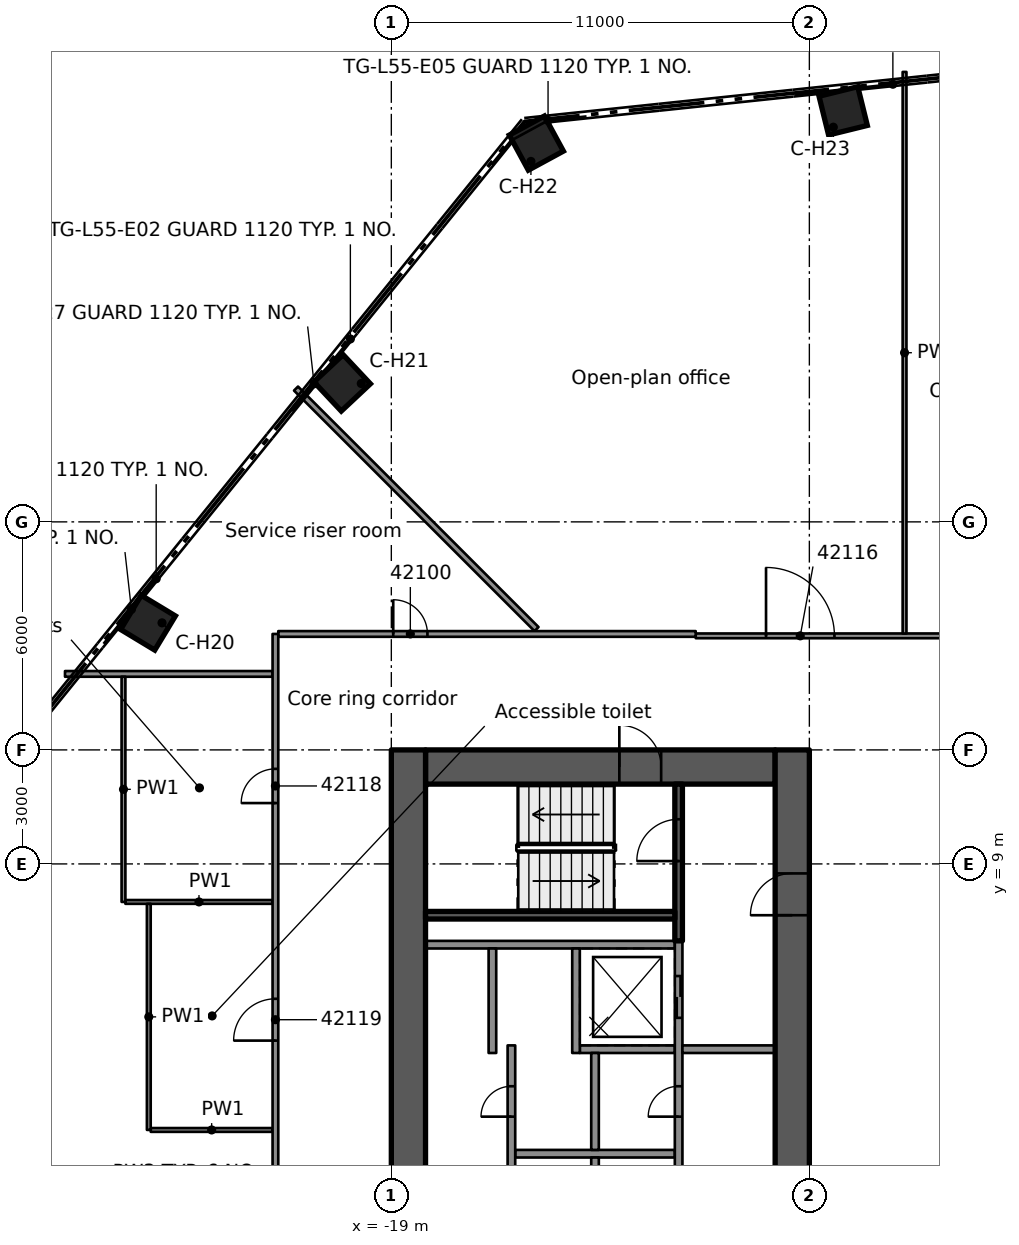
"""IFC4 building model, lengths in metres.
Left out: names, types, materials, properties, quantities, classifications, styles, units other than length and angle.
Written with IfcOpenShell. Run it as: python <this file> out.ifc"""

import sys

from ifc_helpers import new_model, si_unit, direction, frame, frame_2d, origin, origin_2d, place, context, subcontext, project, spatial, rectangle, extrude, element, fill, save


model = new_model("IFC4")
c1 = context("Model", 3, precision=1e-05, world=origin(), true_north=direction((0.0, 1.0)))
c2 = subcontext(c1, "Body", "Model", "MODEL_VIEW")
j1 = project(units=[si_unit("LENGTHUNIT", "METRE"), si_unit("PLANEANGLEUNIT", "RADIAN")], contexts=[c1])
p1 = place(None, origin())
s1 = spatial("IfcSite", under=j1, at=p1, CompositionType="ELEMENT")
p2 = place(p1, origin())
s2 = spatial("IfcBuilding", under=s1, at=p2, CompositionType="ELEMENT")
p3 = place(p2, frame((0.0, 0.0, 210.5)))
s3 = spatial("IfcBuildingStorey", under=s2, at=p3, CompositionType="ELEMENT", Elevation=210.5)
p4 = place(p3, frame((-18.1, 11.55, 0.0), z_axis=(0.0, 0.0, 1.0), x_axis=(1.0, 0.0, 0.0)))
e1 = element("IfcWall", 1, at=p4, inside=s3, PredefinedType="SHEAR", context=c2, shape_type="SweptSolid", body=[
    extrude(rectangle(XDim=9.2, YDim=0.9, at=frame_2d((4.6, 0.0))), origin(), (0.0, 0.0, 1.0), 3.5),
])
p5 = place(p4, frame((5.1, 0.0, 0.0)))
e2 = element("IfcOpeningElement", 2, at=p5, cuts=e1, PredefinedType="OPENING", context=c2, shape_type="SweptSolid", body=[
    extrude(rectangle(XDim=1.1, YDim=2.1, at=frame_2d((0.55, 1.05))), frame((0.0, 0.46, 0.0), z_axis=(0.0, -1.0, 0.0), x_axis=(1.0, 0.0, 0.0)), (0.0, 0.0, 1.0), 0.92),
])
p6 = place(p3, frame((-18.55, -12.0, 0.0), z_axis=(0.0, 0.0, 1.0), x_axis=(0.0, 1.0, 0.0)))
e3 = element("IfcWall", 3, at=p6, inside=s3, PredefinedType="SHEAR", context=c2, shape_type="SweptSolid", body=[
    extrude(rectangle(XDim=24.0, YDim=0.9, at=frame_2d((12.0, 0.0))), origin(), (0.0, 0.0, 1.0), 3.5),
])
p7 = place(p6, frame((10.1, 0.0, 0.0)))
e4 = element("IfcOpeningElement", 4, at=p7, cuts=e3, PredefinedType="OPENING", context=c2, shape_type="SweptSolid", body=[
    extrude(rectangle(XDim=1.8, YDim=2.1, at=frame_2d((0.9, 1.05))), frame((0.0, 0.46, 0.0), z_axis=(0.0, -1.0, 0.0), x_axis=(1.0, 0.0, 0.0)), (0.0, 0.0, 1.0), 0.92),
])
p8 = place(p3, frame((-8.45, -12.0, 0.0), z_axis=(0.0, 0.0, 1.0), x_axis=(0.0, 1.0, 0.0)))
e5 = element("IfcWall", 5, at=p8, inside=s3, PredefinedType="SHEAR", context=c2, shape_type="SweptSolid", body=[
    extrude(rectangle(XDim=24.0, YDim=0.9, at=frame_2d((12.0, 0.0))), origin(), (0.0, 0.0, 1.0), 3.5),
])
p9 = place(p8, frame((9.6, 0.0, 0.0)))
e6 = element("IfcOpeningElement", 6, at=p9, cuts=e5, PredefinedType="OPENING", context=c2, shape_type="SweptSolid", body=[
    extrude(rectangle(XDim=1.8, YDim=2.1, at=frame_2d((0.9, 1.05))), frame((0.0, 0.46, 0.0), z_axis=(0.0, -1.0, 0.0), x_axis=(1.0, 0.0, 0.0)), (0.0, 0.0, 1.0), 0.92),
])
p10 = place(p8, frame((19.65, 0.0, 0.0)))
e7 = element("IfcOpeningElement", 7, at=p10, cuts=e5, PredefinedType="OPENING", context=c2, shape_type="SweptSolid", body=[
    extrude(rectangle(XDim=1.1, YDim=2.1, at=frame_2d((0.55, 1.05))), frame((0.0, 0.46, 0.0), z_axis=(0.0, -1.0, 0.0), x_axis=(1.0, 0.0, 0.0)), (0.0, 0.0, 1.0), 0.92),
])
for number, where, z_axis, x_axis in (
    (8, (-25.403, 15.347, 0.0), (0.0, 0.0, 1.0), (-0.856, 0.517, 0.0)),
    (9, (-20.293, 21.657, 0.0), (0.0, 0.0, 1.0), (-0.684, 0.73, 0.0)),
    (10, (-15.184, 27.966, 0.0), (0.0, 0.0, 1.0), (-0.477, 0.879, 0.0)),
    (11, (-7.11, 28.815, 0.0), (0.0, 0.0, 1.0), (-0.24, 0.971, 0.0)),
):
    element("IfcColumn", number, at=place(p3, frame(where, z_axis=z_axis, x_axis=x_axis)), inside=s3, PredefinedType="COLUMN", context=c2, shape_type="SweptSolid", body=[
        extrude(rectangle(XDim=1.05, YDim=1.05, at=origin_2d()), origin(), (0.0, 0.0, 1.0), 3.5),
    ])
p11 = place(p3, frame((-11.54, 6.875, 0.0), z_axis=(0.0, 0.0, 1.0), x_axis=(-1.0, 0.0, 0.0)))
e12 = element("IfcWall", 12, at=p11, inside=s3, PredefinedType="SOLIDWALL", context=c2, shape_type="SweptSolid", body=[
    extrude(rectangle(XDim=6.56, YDim=0.2, at=frame_2d((3.28, 0.0))), origin(), (0.0, 0.0, 1.0), 3.09),
])
p12 = place(p3, frame((-11.54, 1.375, 0.0), z_axis=(0.0, 0.0, 1.0), x_axis=(-1.0, 0.0, 0.0)))
e13 = element("IfcWall", 13, at=p12, inside=s3, PredefinedType="SOLIDWALL", context=c2, shape_type="SweptSolid", body=[
    extrude(rectangle(XDim=4.2, YDim=0.2, at=frame_2d((2.1, 0.0))), origin(), (0.0, 0.0, 1.0), 3.09),
])
p13 = place(p3, frame((-11.54, 4.125, 0.0), z_axis=(0.0, 0.0, 1.0), x_axis=(-1.0, 0.0, 0.0)))
e14 = element("IfcWall", 14, at=p13, inside=s3, PredefinedType="SOLIDWALL", context=c2, shape_type="SweptSolid", body=[
    extrude(rectangle(XDim=2.5, YDim=0.2, at=frame_2d((1.25, 0.0))), origin(), (0.0, 0.0, 1.0), 3.09),
])
p14 = place(p3, frame((-11.44, -6.975, 0.0), z_axis=(0.0, 0.0, 1.0), x_axis=(0.0, 1.0, 0.0)))
e15 = element("IfcWall", 15, at=p14, inside=s3, PredefinedType="SOLIDWALL", context=c2, shape_type="SweptSolid", body=[
    extrude(rectangle(XDim=13.95, YDim=0.2, at=frame_2d((6.975, 0.0))), origin(), (0.0, 0.0, 1.0), 3.09),
])
p15 = place(p14, frame((0.925, 0.0, 0.0)))
e16 = element("IfcOpeningElement", 16, at=p15, cuts=e15, PredefinedType="OPENING", context=c2, shape_type="SweptSolid", body=[
    extrude(rectangle(XDim=1.1, YDim=2.1, at=frame_2d((0.55, 1.05))), frame((0.0, 0.11, 0.0), z_axis=(0.0, -1.0, 0.0), x_axis=(1.0, 0.0, 0.0)), (0.0, 0.0, 1.0), 0.22),
])
p16 = place(p14, frame((3.675, 0.0, 0.0)))
e17 = element("IfcOpeningElement", 17, at=p16, cuts=e15, PredefinedType="OPENING", context=c2, shape_type="SweptSolid", body=[
    extrude(rectangle(XDim=1.1, YDim=2.1, at=frame_2d((0.55, 1.05))), frame((0.0, 0.11, 0.0), z_axis=(0.0, -1.0, 0.0), x_axis=(1.0, 0.0, 0.0)), (0.0, 0.0, 1.0), 0.22),
])
p17 = place(p14, frame((11.925, 0.0, 0.0)))
e18 = element("IfcOpeningElement", 18, at=p17, cuts=e15, PredefinedType="OPENING", context=c2, shape_type="SweptSolid", body=[
    extrude(rectangle(XDim=1.1, YDim=2.1, at=frame_2d((0.55, 1.05))), frame((0.0, 0.11, 0.0), z_axis=(0.0, -1.0, 0.0), x_axis=(1.0, 0.0, 0.0)), (0.0, 0.0, 1.0), 0.22),
])
p18 = place(p14, frame((6.575, 0.0, 0.0)))
e19 = element("IfcOpeningElement", 19, at=p18, cuts=e15, PredefinedType="OPENING", context=c2, shape_type="SweptSolid", body=[
    extrude(rectangle(XDim=0.8, YDim=2.1, at=frame_2d((0.4, 1.05))), frame((0.0, 0.11, 0.0), z_axis=(0.0, -1.0, 0.0), x_axis=(1.0, 0.0, 0.0)), (0.0, 0.0, 1.0), 0.22),
])
p19 = place(p14, frame((9.325, 0.0, 0.0)))
e20 = element("IfcOpeningElement", 20, at=p19, cuts=e15, PredefinedType="OPENING", context=c2, shape_type="SweptSolid", body=[
    extrude(rectangle(XDim=0.8, YDim=2.1, at=frame_2d((0.4, 1.05))), frame((0.0, 0.11, 0.0), z_axis=(0.0, -1.0, 0.0), x_axis=(1.0, 0.0, 0.0)), (0.0, 0.0, 1.0), 0.22),
])
p20 = place(p3, frame((-13.64, -4.025, 0.0), z_axis=(0.0, 0.0, 1.0), x_axis=(0.0, 1.0, 0.0)))
e21 = element("IfcWall", 21, at=p20, inside=s3, PredefinedType="SOLIDWALL", context=c2, shape_type="SweptSolid", body=[
    extrude(rectangle(XDim=5.3, YDim=0.2, at=frame_2d((2.65, 0.0))), origin(), (0.0, 0.0, 1.0), 3.09),
])
p21 = place(p3, frame((-13.64, 1.475, 0.0), z_axis=(0.0, 0.0, 1.0), x_axis=(0.0, 1.0, 0.0)))
e22 = element("IfcWall", 22, at=p21, inside=s3, PredefinedType="SOLIDWALL", context=c2, shape_type="SweptSolid", body=[
    extrude(rectangle(XDim=2.55, YDim=0.2, at=frame_2d((1.275, 0.0))), origin(), (0.0, 0.0, 1.0), 3.09),
])
p22 = place(p3, frame((-14.14, 4.025, 0.0), z_axis=(0.0, 0.0, 1.0), x_axis=(0.0, 1.0, 0.0)))
e23 = element("IfcWall", 23, at=p22, inside=s3, PredefinedType="SOLIDWALL", context=c2, shape_type="SweptSolid", body=[
    extrude(rectangle(XDim=2.75, YDim=0.2, at=frame_2d((1.375, 0.0))), origin(), (0.0, 0.0, 1.0), 3.09),
])
p23 = place(p3, frame((-15.84, -4.025, 0.0), z_axis=(0.0, 0.0, 1.0), x_axis=(0.0, 1.0, 0.0)))
e24 = element("IfcWall", 24, at=p23, inside=s3, PredefinedType="SOLIDWALL", context=c2, shape_type="SweptSolid", body=[
    extrude(rectangle(XDim=8.25, YDim=0.2, at=frame_2d((4.125, 0.0))), origin(), (0.0, 0.0, 1.0), 3.09),
])
p24 = place(p23, frame((0.875, 0.0, 0.0)))
e25 = element("IfcOpeningElement", 25, at=p24, cuts=e24, PredefinedType="OPENING", context=c2, shape_type="SweptSolid", body=[
    extrude(rectangle(XDim=0.8, YDim=2.1, at=frame_2d((0.4, 1.05))), frame((0.0, 0.11, 0.0), z_axis=(0.0, -1.0, 0.0), x_axis=(1.0, 0.0, 0.0)), (0.0, 0.0, 1.0), 0.22),
])
p25 = place(p23, frame((6.375, 0.0, 0.0)))
e26 = element("IfcOpeningElement", 26, at=p25, cuts=e24, PredefinedType="OPENING", context=c2, shape_type="SweptSolid", body=[
    extrude(rectangle(XDim=0.8, YDim=2.1, at=frame_2d((0.4, 1.05))), frame((0.0, 0.11, 0.0), z_axis=(0.0, -1.0, 0.0), x_axis=(1.0, 0.0, 0.0)), (0.0, 0.0, 1.0), 0.22),
])
p26 = place(p3, frame((-16.34, 4.025, 0.0), z_axis=(0.0, 0.0, 1.0), x_axis=(0.0, 1.0, 0.0)))
e27 = element("IfcWall", 27, at=p26, inside=s3, PredefinedType="SOLIDWALL", context=c2, shape_type="SweptSolid", body=[
    extrude(rectangle(XDim=2.75, YDim=0.2, at=frame_2d((1.375, 0.0))), origin(), (0.0, 0.0, 1.0), 3.09),
])
p27 = place(p3, frame((-11.44, 6.975, 0.0), z_axis=(0.0, 0.0, 1.0), x_axis=(0.0, 1.0, 0.0)))
e28 = element("IfcWall", 28, at=p27, inside=s3, PredefinedType="SOLIDWALL", context=c2, shape_type="SweptSolid", body=[
    extrude(rectangle(XDim=4.125, YDim=0.2, at=frame_2d((2.062, 0.0))), origin(), (0.0, 0.0, 1.0), 3.09),
])
p28 = place(p27, frame((2.1, 0.0, 0.0)))
e29 = element("IfcOpeningElement", 29, at=p28, cuts=e28, PredefinedType="OPENING", context=c2, shape_type="SweptSolid", body=[
    extrude(rectangle(XDim=1.1, YDim=2.1, at=frame_2d((0.55, 1.05))), frame((0.0, 0.11, 0.0), z_axis=(0.0, -1.0, 0.0), x_axis=(1.0, 0.0, 0.0)), (0.0, 0.0, 1.0), 0.22),
])
p29 = place(p3, frame((-11.54, 7.65, 0.0), z_axis=(0.0, 0.0, 1.0), x_axis=(-1.0, 0.0, 0.0)))
e30 = element("IfcWall", 30, at=p29, inside=s3, PredefinedType="SOLIDWALL", context=c2, shape_type="SweptSolid", body=[
    extrude(rectangle(XDim=6.56, YDim=0.2, at=frame_2d((3.28, 0.0))), origin(), (0.0, 0.0, 1.0), 3.09),
])
p30 = place(p3, frame((-8.9, 4.125, 0.0), z_axis=(0.0, 0.0, 1.0), x_axis=(-1.0, 0.0, 0.0)))
e31 = element("IfcWall", 31, at=p30, inside=s3, PredefinedType="PARTITIONING", context=c2, shape_type="SweptSolid", body=[
    extrude(rectangle(XDim=2.44, YDim=0.2, at=frame_2d((1.22, 0.0))), origin(), (0.0, 0.0, 1.0), 3.09),
])
p31 = place(p3, frame((-21.508, 21.508, 0.0), z_axis=(0.0, 0.0, 1.0), x_axis=(0.707106781187, -0.707106781187, 0.0)))
e32 = element("IfcWall", 32, at=p31, inside=s3, PredefinedType="PARTITIONING", context=c2, shape_type="SweptSolid", body=[
    extrude(rectangle(XDim=8.951, YDim=0.15, at=frame_2d((4.475, 0.0))), origin(), (0.0, 0.0, 1.0), 3.08),
])
p32 = place(p3, frame((-25.331, 2.0, 0.0), z_axis=(0.0, 0.0, 1.0), x_axis=(1.0, 0.0, 0.0)))
e33 = element("IfcWall", 33, at=p32, inside=s3, PredefinedType="PARTITIONING", context=c2, shape_type="SweptSolid", body=[
    extrude(rectangle(XDim=3.206, YDim=0.1, at=frame_2d((1.603, 0.0))), origin(), (0.0, 0.0, 1.0), 3.08),
])
p33 = place(p3, frame((-25.998, 8.0, 0.0), z_axis=(0.0, 0.0, 1.0), x_axis=(1.0, 0.0, 0.0)))
e34 = element("IfcWall", 34, at=p33, inside=s3, PredefinedType="PARTITIONING", context=c2, shape_type="SweptSolid", body=[
    extrude(rectangle(XDim=3.873, YDim=0.1, at=frame_2d((1.937, 0.0))), origin(), (0.0, 0.0, 1.0), 3.08),
])
p34 = place(p3, frame((-27.587, 14.0, 0.0), z_axis=(0.0, 0.0, 1.0), x_axis=(1.0, 0.0, 0.0)))
e35 = element("IfcWall", 35, at=p34, inside=s3, PredefinedType="PARTITIONING", context=c2, shape_type="SweptSolid", body=[
    extrude(rectangle(XDim=5.462, YDim=0.15, at=frame_2d((2.731, 0.0))), origin(), (0.0, 0.0, 1.0), 3.08),
])
p35 = place(p3, frame((-10.99, 15.001, 0.0), z_axis=(0.0, 0.0, 1.0), x_axis=(1.0, 0.0, 0.0)))
e36 = element("IfcWall", 36, at=p35, inside=s3, PredefinedType="PARTITIONING", context=c2, shape_type="SweptSolid", body=[
    extrude(rectangle(XDim=21.98, YDim=0.125, at=frame_2d((10.99, 0.0))), origin(), (0.0, 0.0, 1.0), 3.08),
])
p36 = place(p35, frame((18.335, 0.0, 0.0)))
e37 = element("IfcOpeningElement", 37, at=p36, cuts=e36, PredefinedType="OPENING", context=c2, shape_type="SweptSolid", body=[
    extrude(rectangle(XDim=1.8, YDim=2.1, at=frame_2d((0.9, 1.05))), frame((0.0, 0.073, 0.0), z_axis=(0.0, -1.0, 0.0), x_axis=(1.0, 0.0, 0.0)), (0.0, 0.0, 1.0), 0.145),
])
p37 = place(p35, frame((13.09, 0.0, 0.0)))
e38 = element("IfcOpeningElement", 38, at=p37, cuts=e36, PredefinedType="OPENING", context=c2, shape_type="SweptSolid", body=[
    extrude(rectangle(XDim=1.1, YDim=2.1, at=frame_2d((0.55, 1.05))), frame((0.0, 0.073, 0.0), z_axis=(0.0, -1.0, 0.0), x_axis=(1.0, 0.0, 0.0)), (0.0, 0.0, 1.0), 0.145),
])
p38 = place(p35, frame((7.595, 0.0, 0.0)))
e39 = element("IfcOpeningElement", 39, at=p38, cuts=e36, PredefinedType="OPENING", context=c2, shape_type="SweptSolid", body=[
    extrude(rectangle(XDim=1.1, YDim=2.1, at=frame_2d((0.55, 1.05))), frame((0.0, 0.073, 0.0), z_axis=(0.0, -1.0, 0.0), x_axis=(1.0, 0.0, 0.0)), (0.0, 0.0, 1.0), 0.145),
])
p39 = place(p35, frame((1.85, 0.0, 0.0)))
e40 = element("IfcOpeningElement", 40, at=p39, cuts=e36, PredefinedType="OPENING", context=c2, shape_type="SweptSolid", body=[
    extrude(rectangle(XDim=1.8, YDim=2.1, at=frame_2d((0.9, 1.05))), frame((0.0, 0.073, 0.0), z_axis=(0.0, -1.0, 0.0), x_axis=(1.0, 0.0, 0.0)), (0.0, 0.0, 1.0), 0.145),
])
p40 = place(p3, frame((-21.975, 15.051, 0.0), z_axis=(0.0, 0.0, 1.0), x_axis=(1.0, 0.0, 0.0)))
e41 = element("IfcWall", 41, at=p40, inside=s3, PredefinedType="PARTITIONING", context=c2, shape_type="SweptSolid", body=[
    extrude(rectangle(XDim=10.984, YDim=0.15, at=frame_2d((5.492, 0.0))), origin(), (0.0, 0.0, 1.0), 3.08),
])
p41 = place(p40, frame((3.025, 0.0, 0.0)))
e42 = element("IfcOpeningElement", 42, at=p41, cuts=e41, PredefinedType="OPENING", context=c2, shape_type="SweptSolid", body=[
    extrude(rectangle(XDim=0.9, YDim=2.1, at=frame_2d((0.45, 1.05))), frame((0.0, 0.085, 0.0), z_axis=(0.0, -1.0, 0.0), x_axis=(1.0, 0.0, 0.0)), (0.0, 0.0, 1.0), 0.17),
])
p42 = place(p3, frame((-5.495, 15.063, 0.0), z_axis=(0.0, 0.0, 1.0), x_axis=(0.0, 1.0, 0.0)))
e43 = element("IfcWall", 43, at=p42, inside=s3, PredefinedType="PARTITIONING", context=c2, shape_type="SweptSolid", body=[
    extrude(rectangle(XDim=14.776, YDim=0.1, at=frame_2d((7.388, 0.0))), origin(), (0.0, 0.0, 1.0), 3.08),
])
p43 = place(p3, frame((-22.05, -15.051, 0.0), z_axis=(0.0, 0.0, 1.0), x_axis=(0.0, 1.0, 0.0)))
e44 = element("IfcWall", 44, at=p43, inside=s3, PredefinedType="PARTITIONING", context=c2, shape_type="SweptSolid", body=[
    extrude(rectangle(XDim=30.102, YDim=0.15, at=frame_2d((15.051, 0.0))), origin(), (0.0, 0.0, 1.0), 3.08),
])
p44 = place(p43, frame((8.151, 0.0, 0.0)))
e45 = element("IfcOpeningElement", 45, at=p44, cuts=e44, PredefinedType="OPENING", context=c2, shape_type="SweptSolid", body=[
    extrude(rectangle(XDim=1.8, YDim=2.1, at=frame_2d((0.9, 1.05))), frame((0.0, 0.085, 0.0), z_axis=(0.0, -1.0, 0.0), x_axis=(1.0, 0.0, 0.0)), (0.0, 0.0, 1.0), 0.17),
])
p45 = place(p43, frame((25.652, 0.0, 0.0)))
e46 = element("IfcOpeningElement", 46, at=p45, cuts=e44, PredefinedType="OPENING", context=c2, shape_type="SweptSolid", body=[
    extrude(rectangle(XDim=0.9, YDim=2.1, at=frame_2d((0.45, 1.05))), frame((0.0, 0.085, 0.0), z_axis=(0.0, -1.0, 0.0), x_axis=(1.0, 0.0, 0.0)), (0.0, 0.0, 1.0), 0.17),
])
p46 = place(p43, frame((19.402, 0.0, 0.0)))
e47 = element("IfcOpeningElement", 47, at=p46, cuts=e44, PredefinedType="OPENING", context=c2, shape_type="SweptSolid", body=[
    extrude(rectangle(XDim=1.1, YDim=2.1, at=frame_2d((0.55, 1.05))), frame((0.0, 0.085, 0.0), z_axis=(0.0, -1.0, 0.0), x_axis=(1.0, 0.0, 0.0)), (0.0, 0.0, 1.0), 0.17),
])
p47 = place(p3, frame((-25.382, 2.001, 0.0), z_axis=(0.0, 0.0, 1.0), x_axis=(0.0, 1.0, 0.0)))
e48 = element("IfcWall", 48, at=p47, inside=s3, PredefinedType="PARTITIONING", context=c2, shape_type="SweptSolid", body=[
    extrude(rectangle(XDim=5.949, YDim=0.1, at=frame_2d((2.975, 0.0))), origin(), (0.0, 0.0, 1.0), 3.08),
])
p48 = place(p3, frame((-26.048, 8.0, 0.0), z_axis=(0.0, 0.0, 1.0), x_axis=(0.0, 1.0, 0.0)))
e49 = element("IfcWall", 49, at=p48, inside=s3, PredefinedType="PARTITIONING", context=c2, shape_type="SweptSolid", body=[
    extrude(rectangle(XDim=5.925, YDim=0.1, at=frame_2d((2.962, 0.0))), origin(), (0.0, 0.0, 1.0), 3.08),
])
p49 = place(p17, origin())
e50 = element("IfcDoor", 50, at=p49, inside=s3, OperationType="DOUBLE_DOOR_SLIDING", PredefinedType="DOOR", context=c2, shape_type="SweptSolid", body=[
    extrude(rectangle(XDim=1.1, YDim=2.1, at=frame_2d((0.55, 1.05))), frame((0.0, 0.025, 0.0), z_axis=(0.0, -1.0, 0.0), x_axis=(1.0, 0.0, 0.0)), (0.0, 0.0, 1.0), 0.05),
])
fill(e18, e50)
p50 = place(p19, origin())
e51 = element("IfcDoor", 51, at=p50, inside=s3, OperationType="SINGLE_SWING_LEFT", PredefinedType="DOOR", context=c2, shape_type="SweptSolid", body=[
    extrude(rectangle(XDim=0.8, YDim=2.1, at=frame_2d((0.4, 1.05))), frame((0.0, 0.025, 0.0), z_axis=(0.0, -1.0, 0.0), x_axis=(1.0, 0.0, 0.0)), (0.0, 0.0, 1.0), 0.05),
])
fill(e20, e51)
p51 = place(p25, origin())
e52 = element("IfcDoor", 52, at=p51, inside=s3, OperationType="SINGLE_SWING_LEFT", PredefinedType="DOOR", context=c2, shape_type="SweptSolid", body=[
    extrude(rectangle(XDim=0.8, YDim=2.1, at=frame_2d((0.4, 1.05))), frame((0.0, 0.025, 0.0), z_axis=(0.0, -1.0, 0.0), x_axis=(1.0, 0.0, 0.0)), (0.0, 0.0, 1.0), 0.05),
])
fill(e26, e52)
p52 = place(p10, origin())
e53 = element("IfcDoor", 53, at=p52, inside=s3, OperationType="SINGLE_SWING_RIGHT", PredefinedType="DOOR", context=c2, shape_type="SweptSolid", body=[
    extrude(rectangle(XDim=1.1, YDim=2.1, at=frame_2d((0.55, 1.05))), frame((0.0, 0.025, 0.0), z_axis=(0.0, -1.0, 0.0), x_axis=(1.0, 0.0, 0.0)), (0.0, 0.0, 1.0), 0.05),
])
fill(e7, e53)
p53 = place(p5, origin())
e54 = element("IfcDoor", 54, at=p53, inside=s3, OperationType="SINGLE_SWING_RIGHT", PredefinedType="DOOR", context=c2, shape_type="SweptSolid", body=[
    extrude(rectangle(XDim=1.1, YDim=2.1, at=frame_2d((0.55, 1.05))), frame((0.0, 0.025, 0.0), z_axis=(0.0, -1.0, 0.0), x_axis=(1.0, 0.0, 0.0)), (0.0, 0.0, 1.0), 0.05),
])
fill(e2, e54)
p54 = place(p28, origin())
e55 = element("IfcDoor", 55, at=p54, inside=s3, OperationType="SINGLE_SWING_RIGHT", PredefinedType="DOOR", context=c2, shape_type="SweptSolid", body=[
    extrude(rectangle(XDim=1.1, YDim=2.1, at=frame_2d((0.55, 1.05))), frame((0.0, 0.025, 0.0), z_axis=(0.0, -1.0, 0.0), x_axis=(1.0, 0.0, 0.0)), (0.0, 0.0, 1.0), 0.05),
])
fill(e29, e55)
p55 = place(p41, origin())
e56 = element("IfcDoor", 56, at=p55, inside=s3, OperationType="SINGLE_SWING_LEFT", PredefinedType="DOOR", context=c2, shape_type="SweptSolid", body=[
    extrude(rectangle(XDim=0.9, YDim=2.1, at=frame_2d((0.45, 1.05))), frame((0.0, 0.025, 0.0), z_axis=(0.0, -1.0, 0.0), x_axis=(1.0, 0.0, 0.0)), (0.0, 0.0, 1.0), 0.05),
])
fill(e42, e56)
p56 = place(p39, origin())
e57 = element("IfcDoor", 57, at=p56, inside=s3, OperationType="DOUBLE_DOOR_SINGLE_SWING", PredefinedType="DOOR", context=c2, shape_type="SweptSolid", body=[
    extrude(rectangle(XDim=1.8, YDim=2.1, at=frame_2d((0.9, 1.05))), frame((0.0, 0.025, 0.0), z_axis=(0.0, -1.0, 0.0), x_axis=(1.0, 0.0, 0.0)), (0.0, 0.0, 1.0), 0.05),
])
fill(e40, e57)
p57 = place(p45, origin())
e58 = element("IfcDoor", 58, at=p57, inside=s3, OperationType="SINGLE_SWING_RIGHT", PredefinedType="DOOR", context=c2, shape_type="SweptSolid", body=[
    extrude(rectangle(XDim=0.9, YDim=2.1, at=frame_2d((0.45, 1.05))), frame((0.0, 0.025, 0.0), z_axis=(0.0, -1.0, 0.0), x_axis=(1.0, 0.0, 0.0)), (0.0, 0.0, 1.0), 0.05),
])
fill(e46, e58)
p58 = place(p46, origin())
e59 = element("IfcDoor", 59, at=p58, inside=s3, OperationType="SINGLE_SWING_RIGHT", PredefinedType="DOOR", context=c2, shape_type="SweptSolid", body=[
    extrude(rectangle(XDim=1.1, YDim=2.1, at=frame_2d((0.55, 1.05))), frame((0.0, 0.025, 0.0), z_axis=(0.0, -1.0, 0.0), x_axis=(1.0, 0.0, 0.0)), (0.0, 0.0, 1.0), 0.05),
])
fill(e47, e59)
save(model, sys.argv[1])
